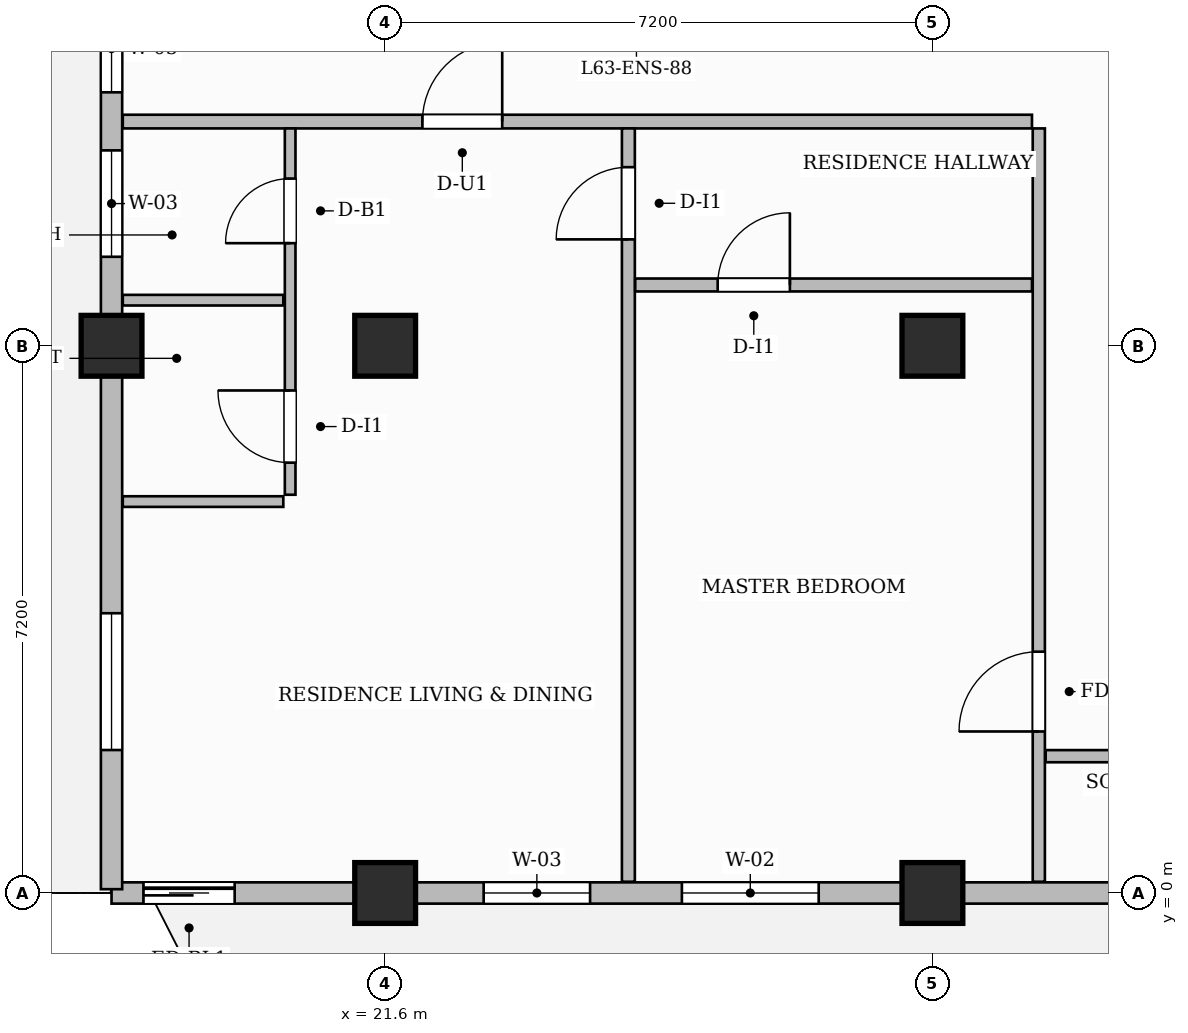
"""IFC4 building model, lengths in metres.
Left out: names, types, materials, properties, quantities, classifications, styles, units other than length and angle.
Written with IfcOpenShell. Run it as: python <this file> out.ifc"""

import sys

from ifc_helpers import new_model, si_unit, direction, frame, frame_2d, origin, origin_2d, place, context, subcontext, project, spatial, rectangle, extrude, source, transform, mapped, element, fill, save


model = new_model("IFC4")
c1 = context("Model", 3, precision=1e-05, world=origin(), true_north=direction((0.0, 1.0)))
c2 = subcontext(c1, "Body", "Model", "MODEL_VIEW")
j1 = project(units=[si_unit("LENGTHUNIT", "METRE"), si_unit("PLANEANGLEUNIT", "RADIAN")], contexts=[c1])
p1 = place(None, origin())
s1 = spatial("IfcSite", under=j1, at=p1, CompositionType="ELEMENT")
p2 = place(p1, origin())
s2 = spatial("IfcBuilding", under=s1, at=p2, CompositionType="ELEMENT")
p3 = place(p2, frame((0.0, 0.0, 251.95)))
s3 = spatial("IfcBuildingStorey", under=s2, at=p3, CompositionType="ELEMENT", Elevation=251.95)
m1 = source(origin(), c2, "Body", "SweptSolid", [
    extrude(rectangle(XDim=0.8, YDim=0.8, at=origin_2d()), origin(), (0.0, 0.0, 1.0), 3.85),
])
for number, where, z_axis, x_axis in (
    (1, (21.6, 0.0, 0.0), (0.0, 0.0, 1.0), (1.0, 0.0, 0.0)),
    (2, (21.6, 7.2, 0.0), (0.0, 0.0, 1.0), (1.0, 0.0, 0.0)),
    (3, (28.8, 0.0, 0.0), (0.0, 0.0, 1.0), (1.0, 0.0, 0.0)),
    (4, (28.8, 7.2, 0.0), (0.0, 0.0, 1.0), (1.0, 0.0, 0.0)),
    (5, (18.0, 7.2, 0.0), (0.0, 0.0, 1.0), (1.0, 0.0, 0.0)),
):
    element("IfcColumn", number, at=place(p3, frame(where, z_axis=z_axis, x_axis=x_axis)), inside=s3, PredefinedType="COLUMN", context=c2, shape_type="MappedRepresentation", body=[
        mapped(m1, transform((0.0, 0.0, 0.0), scale=1.0)),
    ])
p4 = place(p3, frame((18.148, 10.15, 0.0), z_axis=(0.0, 0.0, 1.0), x_axis=(1.0, 0.0, 0.0)))
e6 = element("IfcWall", 6, at=p4, inside=s3, PredefinedType="PARTITIONING", context=c2, shape_type="SweptSolid", body=[
    extrude(rectangle(XDim=11.962, YDim=0.18, at=frame_2d((5.981, 0.0))), origin(), (0.0, 0.0, 1.0), 3.6),
])
p5 = place(p4, frame((3.942, 0.0, 0.0)))
e7 = element("IfcOpeningElement", 7, at=p5, cuts=e6, PredefinedType="OPENING", context=c2, shape_type="SweptSolid", body=[
    extrude(rectangle(XDim=1.05, YDim=2.25, at=frame_2d((0.525, 1.125))), frame((0.0, 0.1, 0.0), z_axis=(0.0, -1.0, 0.0), x_axis=(1.0, 0.0, 0.0)), (0.0, 0.0, 1.0), 0.2),
])
p6 = place(p3, frame((30.2, 0.148, 0.0), z_axis=(0.0, 0.0, 1.0), x_axis=(0.0, 1.0, 0.0)))
e8 = element("IfcWall", 8, at=p6, inside=s3, PredefinedType="PARTITIONING", context=c2, shape_type="SweptSolid", body=[
    extrude(rectangle(XDim=9.912, YDim=0.16, at=frame_2d((4.956, 0.0))), origin(), (0.0, 0.0, 1.0), 3.6),
])
p7 = place(p6, frame((1.977, 0.0, 0.0)))
e9 = element("IfcOpeningElement", 9, at=p7, cuts=e8, PredefinedType="OPENING", context=c2, shape_type="SweptSolid", body=[
    extrude(rectangle(XDim=1.05, YDim=2.15, at=frame_2d((0.525, 1.075))), frame((0.0, 0.09, 0.0), z_axis=(0.0, -1.0, 0.0), x_axis=(1.0, 0.0, 0.0)), (0.0, 0.0, 1.0), 0.18),
])
p8 = place(p3, frame((30.29, 1.8, 0.0), z_axis=(0.0, 0.0, 1.0), x_axis=(1.0, 0.0, 0.0)))
e10 = element("IfcWall", 10, at=p8, inside=s3, PredefinedType="PARTITIONING", context=c2, shape_type="SweptSolid", body=[
    extrude(rectangle(XDim=19.37, YDim=0.16, at=frame_2d((9.685, 0.0))), origin(), (0.0, 0.0, 1.0), 3.6),
])
p9 = place(p8, frame((5.074, 0.0, 0.0)))
e11 = element("IfcOpeningElement", 11, at=p9, cuts=e10, PredefinedType="OPENING", context=c2, shape_type="SweptSolid", body=[
    extrude(rectangle(XDim=0.9, YDim=2.15, at=frame_2d((0.45, 1.075))), frame((0.0, 0.09, 0.0), z_axis=(0.0, -1.0, 0.0), x_axis=(1.0, 0.0, 0.0)), (0.0, 0.0, 1.0), 0.18),
])
p10 = place(p8, frame((14.06, 0.0, 0.0)))
e12 = element("IfcOpeningElement", 12, at=p10, cuts=e10, PredefinedType="OPENING", context=c2, shape_type="SweptSolid", body=[
    extrude(rectangle(XDim=0.9, YDim=2.15, at=frame_2d((0.45, 1.075))), frame((0.0, 0.09, 0.0), z_axis=(0.0, -1.0, 0.0), x_axis=(1.0, 0.0, 0.0)), (0.0, 0.0, 1.0), 0.18),
])
p11 = place(p3, frame((20.35, 5.24, 0.0), z_axis=(0.0, 0.0, 1.0), x_axis=(0.0, 1.0, 0.0)))
e13 = element("IfcWall", 13, at=p11, inside=s3, PredefinedType="PARTITIONING", context=c2, shape_type="SweptSolid", body=[
    extrude(rectangle(XDim=4.82, YDim=0.14, at=frame_2d((2.41, 0.0))), origin(), (0.0, 0.0, 1.0), 3.6),
])
p12 = place(p11, frame((0.422, 0.0, 0.0)))
e14 = element("IfcOpeningElement", 14, at=p12, cuts=e13, PredefinedType="OPENING", context=c2, shape_type="SweptSolid", body=[
    extrude(rectangle(XDim=0.95, YDim=2.15, at=frame_2d((0.475, 1.075))), frame((0.0, 0.08, 0.0), z_axis=(0.0, -1.0, 0.0), x_axis=(1.0, 0.0, 0.0)), (0.0, 0.0, 1.0), 0.16),
])
p13 = place(p11, frame((3.31, 0.0, 0.0)))
e15 = element("IfcOpeningElement", 15, at=p13, cuts=e13, PredefinedType="OPENING", context=c2, shape_type="SweptSolid", body=[
    extrude(rectangle(XDim=0.85, YDim=2.1, at=frame_2d((0.425, 1.05))), frame((0.0, 0.08, 0.0), z_axis=(0.0, -1.0, 0.0), x_axis=(1.0, 0.0, 0.0)), (0.0, 0.0, 1.0), 0.16),
])
for number, where, z_axis, x_axis in (
    (16, (18.148, 7.8, 0.0), (0.0, 0.0, 1.0), (1.0, 0.0, 0.0)),
    (17, (18.148, 5.15, 0.0), (0.0, 0.0, 1.0), (1.0, 0.0, 0.0)),
):
    element("IfcWall", number, at=place(p3, frame(where, z_axis=z_axis, x_axis=x_axis)), inside=s3, PredefinedType="PARTITIONING", context=c2, shape_type="SweptSolid", body=[
        extrude(rectangle(XDim=2.112, YDim=0.14, at=frame_2d((1.056, 0.0))), origin(), (0.0, 0.0, 1.0), 3.6),
    ])
p14 = place(p3, frame((24.8, 0.148, 0.0), z_axis=(0.0, 0.0, 1.0), x_axis=(0.0, 1.0, 0.0)))
e18 = element("IfcWall", 18, at=p14, inside=s3, PredefinedType="PARTITIONING", context=c2, shape_type="SweptSolid", body=[
    extrude(rectangle(XDim=9.912, YDim=0.17, at=frame_2d((4.956, 0.0))), origin(), (0.0, 0.0, 1.0), 3.6),
])
p15 = place(p14, frame((8.452, 0.0, 0.0)))
e19 = element("IfcOpeningElement", 19, at=p15, cuts=e18, PredefinedType="OPENING", context=c2, shape_type="SweptSolid", body=[
    extrude(rectangle(XDim=0.95, YDim=2.15, at=frame_2d((0.475, 1.075))), frame((0.0, 0.095, 0.0), z_axis=(0.0, -1.0, 0.0), x_axis=(1.0, 0.0, 0.0)), (0.0, 0.0, 1.0), 0.19),
])
p16 = place(p3, frame((24.89, 8.0, 0.0), z_axis=(0.0, 0.0, 1.0), x_axis=(1.0, 0.0, 0.0)))
e20 = element("IfcWall", 20, at=p16, inside=s3, PredefinedType="PARTITIONING", context=c2, shape_type="SweptSolid", body=[
    extrude(rectangle(XDim=5.22, YDim=0.17, at=frame_2d((2.61, 0.0))), origin(), (0.0, 0.0, 1.0), 3.6),
])
p17 = place(p16, frame((1.085, 0.0, 0.0)))
e21 = element("IfcOpeningElement", 21, at=p17, cuts=e20, PredefinedType="OPENING", context=c2, shape_type="SweptSolid", body=[
    extrude(rectangle(XDim=0.95, YDim=2.15, at=frame_2d((0.475, 1.075))), frame((0.0, 0.095, 0.0), z_axis=(0.0, -1.0, 0.0), x_axis=(1.0, 0.0, 0.0)), (0.0, 0.0, 1.0), 0.19),
])
p18 = place(p3, frame((18.0, 0.0, 0.0), z_axis=(0.0, 0.0, 1.0), x_axis=(1.0, 0.0, 0.0)))
e22 = element("IfcWall", 22, at=p18, inside=s3, PredefinedType="SOLIDWALL", context=c2, shape_type="SweptSolid", body=[
    extrude(rectangle(XDim=31.8, YDim=0.28, at=frame_2d((15.9, 0.0))), origin(), (0.0, 0.0, 1.0), 3.135),
])
p19 = place(p18, frame((0.42, 0.0, 0.0)))
e23 = element("IfcOpeningElement", 23, at=p19, cuts=e22, PredefinedType="OPENING", context=c2, shape_type="SweptSolid", body=[
    extrude(rectangle(XDim=1.2, YDim=2.2, at=frame_2d((0.6, 1.1))), frame((0.0, 0.15, 0.0), z_axis=(0.0, -1.0, 0.0), x_axis=(1.0, 0.0, 0.0)), (0.0, 0.0, 1.0), 0.3),
])
p20 = place(p18, frame((4.896, 0.0, 0.8)))
e24 = element("IfcOpeningElement", 24, at=p20, cuts=e22, PredefinedType="OPENING", context=c2, shape_type="SweptSolid", body=[
    extrude(rectangle(XDim=1.4, YDim=1.85, at=frame_2d((0.7, 0.925))), frame((0.0, 0.15, 0.0), z_axis=(0.0, -1.0, 0.0), x_axis=(1.0, 0.0, 0.0)), (0.0, 0.0, 1.0), 0.3),
])
p21 = place(p18, frame((7.504, 0.0, 0.8)))
e25 = element("IfcOpeningElement", 25, at=p21, cuts=e22, PredefinedType="OPENING", context=c2, shape_type="SweptSolid", body=[
    extrude(rectangle(XDim=1.8, YDim=1.85, at=frame_2d((0.9, 0.925))), frame((0.0, 0.15, 0.0), z_axis=(0.0, -1.0, 0.0), x_axis=(1.0, 0.0, 0.0)), (0.0, 0.0, 1.0), 0.3),
])
p22 = place(p18, frame((13.204, 0.0, 0.8)))
e26 = element("IfcOpeningElement", 26, at=p22, cuts=e22, PredefinedType="OPENING", context=c2, shape_type="SweptSolid", body=[
    extrude(rectangle(XDim=1.8, YDim=1.85, at=frame_2d((0.9, 0.925))), frame((0.0, 0.15, 0.0), z_axis=(0.0, -1.0, 0.0), x_axis=(1.0, 0.0, 0.0)), (0.0, 0.0, 1.0), 0.3),
])
p23 = place(p18, frame((18.796, 0.0, 0.8)))
e27 = element("IfcOpeningElement", 27, at=p23, cuts=e22, PredefinedType="OPENING", context=c2, shape_type="SweptSolid", body=[
    extrude(rectangle(XDim=1.8, YDim=1.85, at=frame_2d((0.9, 0.925))), frame((0.0, 0.15, 0.0), z_axis=(0.0, -1.0, 0.0), x_axis=(1.0, 0.0, 0.0)), (0.0, 0.0, 1.0), 0.3),
])
p24 = place(p18, frame((22.029, 0.0, 0.8)))
e28 = element("IfcOpeningElement", 28, at=p24, cuts=e22, PredefinedType="OPENING", context=c2, shape_type="SweptSolid", body=[
    extrude(rectangle(XDim=0.95, YDim=1.75, at=frame_2d((0.475, 0.875))), frame((0.0, 0.15, 0.0), z_axis=(0.0, -1.0, 0.0), x_axis=(1.0, 0.0, 0.0)), (0.0, 0.0, 1.0), 0.3),
])
p25 = place(p18, frame((25.475, 0.0, 0.8)))
e29 = element("IfcOpeningElement", 29, at=p25, cuts=e22, PredefinedType="OPENING", context=c2, shape_type="SweptSolid", body=[
    extrude(rectangle(XDim=1.8, YDim=1.85, at=frame_2d((0.9, 0.925))), frame((0.0, 0.15, 0.0), z_axis=(0.0, -1.0, 0.0), x_axis=(1.0, 0.0, 0.0)), (0.0, 0.0, 1.0), 0.3),
])
p26 = place(p18, frame((28.525, 0.0, 0.8)))
e30 = element("IfcOpeningElement", 30, at=p26, cuts=e22, PredefinedType="OPENING", context=c2, shape_type="SweptSolid", body=[
    extrude(rectangle(XDim=1.8, YDim=1.85, at=frame_2d((0.9, 0.925))), frame((0.0, 0.15, 0.0), z_axis=(0.0, -1.0, 0.0), x_axis=(1.0, 0.0, 0.0)), (0.0, 0.0, 1.0), 0.3),
])
p27 = place(p3, frame((18.0, 0.05, 0.0), z_axis=(0.0, 0.0, 1.0), x_axis=(0.0, 1.0, 0.0)))
e31 = element("IfcWall", 31, at=p27, inside=s3, PredefinedType="SOLIDWALL", context=c2, shape_type="SweptSolid", body=[
    extrude(rectangle(XDim=21.5, YDim=0.28, at=frame_2d((10.75, 0.0))), origin(), (0.0, 0.0, 1.0), 3.6),
])
p28 = place(p27, frame((1.831, 0.0, 0.8)))
e32 = element("IfcOpeningElement", 32, at=p28, cuts=e31, PredefinedType="OPENING", context=c2, shape_type="SweptSolid", body=[
    extrude(rectangle(XDim=1.8, YDim=1.85, at=frame_2d((0.9, 0.925))), frame((0.0, 0.15, 0.0), z_axis=(0.0, -1.0, 0.0), x_axis=(1.0, 0.0, 0.0)), (0.0, 0.0, 1.0), 0.3),
])
p29 = place(p27, frame((8.321, 0.0, 0.8)))
e33 = element("IfcOpeningElement", 33, at=p29, cuts=e31, PredefinedType="OPENING", context=c2, shape_type="SweptSolid", body=[
    extrude(rectangle(XDim=1.4, YDim=1.85, at=frame_2d((0.7, 0.925))), frame((0.0, 0.15, 0.0), z_axis=(0.0, -1.0, 0.0), x_axis=(1.0, 0.0, 0.0)), (0.0, 0.0, 1.0), 0.3),
])
p30 = place(p27, frame((10.485, 0.0, 0.8)))
e34 = element("IfcOpeningElement", 34, at=p30, cuts=e31, PredefinedType="OPENING", context=c2, shape_type="SweptSolid", body=[
    extrude(rectangle(XDim=1.15, YDim=1.8, at=frame_2d((0.575, 0.9))), frame((0.0, 0.15, 0.0), z_axis=(0.0, -1.0, 0.0), x_axis=(1.0, 0.0, 0.0)), (0.0, 0.0, 1.0), 0.3),
])
p31 = place(p27, frame((12.295, 0.0, 0.8)))
e35 = element("IfcOpeningElement", 35, at=p31, cuts=e31, PredefinedType="OPENING", context=c2, shape_type="SweptSolid", body=[
    extrude(rectangle(XDim=0.95, YDim=1.75, at=frame_2d((0.475, 0.875))), frame((0.0, 0.15, 0.0), z_axis=(0.0, -1.0, 0.0), x_axis=(1.0, 0.0, 0.0)), (0.0, 0.0, 1.0), 0.3),
])
p32 = place(p27, frame((15.77, 0.0, 0.8)))
e36 = element("IfcOpeningElement", 36, at=p32, cuts=e31, PredefinedType="OPENING", context=c2, shape_type="SweptSolid", body=[
    extrude(rectangle(XDim=1.8, YDim=1.85, at=frame_2d((0.9, 0.925))), frame((0.0, 0.15, 0.0), z_axis=(0.0, -1.0, 0.0), x_axis=(1.0, 0.0, 0.0)), (0.0, 0.0, 1.0), 0.3),
])
p33 = place(p27, frame((18.71, 0.0, 0.8)))
e37 = element("IfcOpeningElement", 37, at=p33, cuts=e31, PredefinedType="OPENING", context=c2, shape_type="SweptSolid", body=[
    extrude(rectangle(XDim=1.8, YDim=1.85, at=frame_2d((0.9, 0.925))), frame((0.0, 0.15, 0.0), z_axis=(0.0, -1.0, 0.0), x_axis=(1.0, 0.0, 0.0)), (0.0, 0.0, 1.0), 0.3),
])
m2 = source(origin(), c2, "Body", "SweptSolid", [
    extrude(rectangle(XDim=1.05, YDim=2.15, at=frame_2d((0.525, 1.075))), frame((0.0, 0.025, 0.0), z_axis=(0.0, -1.0, 0.0), x_axis=(1.0, 0.0, 0.0)), (0.0, 0.0, 1.0), 0.05),
])
p34 = place(p7, origin())
e38 = element("IfcDoor", 38, at=p34, inside=s3, OperationType="SINGLE_SWING_LEFT", PredefinedType="DOOR", context=c2, shape_type="MappedRepresentation", body=[
    mapped(m2, transform((0.0, 0.0, 0.0), scale=1.0)),
])
fill(e9, e38)
m3 = source(origin(), c2, "Body", "SweptSolid", [
    extrude(rectangle(XDim=0.95, YDim=2.15, at=frame_2d((0.475, 1.075))), frame((0.0, 0.025, 0.0), z_axis=(0.0, -1.0, 0.0), x_axis=(1.0, 0.0, 0.0)), (0.0, 0.0, 1.0), 0.05),
])
p35 = place(p12, origin())
e39 = element("IfcDoor", 39, at=p35, inside=s3, OperationType="SINGLE_SWING_RIGHT", PredefinedType="DOOR", context=c2, shape_type="MappedRepresentation", body=[
    mapped(m3, transform((0.0, 0.0, 0.0), scale=1.0)),
])
fill(e14, e39)
m4 = source(origin(), c2, "Body", "SweptSolid", [
    extrude(rectangle(XDim=0.85, YDim=2.1, at=frame_2d((0.425, 1.05))), frame((0.0, 0.025, 0.0), z_axis=(0.0, -1.0, 0.0), x_axis=(1.0, 0.0, 0.0)), (0.0, 0.0, 1.0), 0.05),
])
p36 = place(p13, origin())
e40 = element("IfcDoor", 40, at=p36, inside=s3, OperationType="SINGLE_SWING_LEFT", PredefinedType="DOOR", context=c2, shape_type="MappedRepresentation", body=[
    mapped(m4, transform((0.0, 0.0, 0.0), scale=1.0)),
])
fill(e15, e40)
m5 = source(origin(), c2, "Body", "SweptSolid", [
    extrude(rectangle(XDim=1.05, YDim=2.25, at=frame_2d((0.525, 1.125))), frame((0.0, 0.025, 0.0), z_axis=(0.0, -1.0, 0.0), x_axis=(1.0, 0.0, 0.0)), (0.0, 0.0, 1.0), 0.05),
])
p37 = place(p5, origin())
e41 = element("IfcDoor", 41, at=p37, inside=s3, OperationType="SINGLE_SWING_RIGHT", PredefinedType="DOOR", context=c2, shape_type="MappedRepresentation", body=[
    mapped(m5, transform((0.0, 0.0, 0.0), scale=1.0)),
])
fill(e7, e41)
p38 = place(p15, origin())
e42 = element("IfcDoor", 42, at=p38, inside=s3, OperationType="SINGLE_SWING_LEFT", PredefinedType="DOOR", context=c2, shape_type="MappedRepresentation", body=[
    mapped(m3, transform((0.0, 0.0, 0.0), scale=1.0)),
])
fill(e19, e42)
p39 = place(p17, origin())
e43 = element("IfcDoor", 43, at=p39, inside=s3, OperationType="SINGLE_SWING_RIGHT", PredefinedType="DOOR", context=c2, shape_type="MappedRepresentation", body=[
    mapped(m3, transform((0.0, 0.0, 0.0), scale=1.0)),
])
fill(e21, e43)
m6 = source(origin(), c2, "Body", "SweptSolid", [
    extrude(rectangle(XDim=1.2, YDim=2.2, at=frame_2d((0.6, 1.1))), frame((0.0, 0.025, 0.0), z_axis=(0.0, -1.0, 0.0), x_axis=(1.0, 0.0, 0.0)), (0.0, 0.0, 1.0), 0.05),
])
p40 = place(p19, origin())
e44 = element("IfcDoor", 44, at=p40, inside=s3, OperationType="SLIDING_TO_LEFT", PredefinedType="DOOR", context=c2, shape_type="MappedRepresentation", body=[
    mapped(m6, transform((0.0, 0.0, 0.0), scale=1.0)),
])
fill(e23, e44)
m7 = source(origin(), c2, "Body", "SweptSolid", [
    extrude(rectangle(XDim=1.4, YDim=1.85, at=frame_2d((0.7, 0.925))), frame((0.0, 0.03, 0.0), z_axis=(0.0, -1.0, 0.0), x_axis=(1.0, 0.0, 0.0)), (0.0, 0.0, 1.0), 0.06),
])
p41 = place(p20, origin())
e45 = element("IfcWindow", 45, at=p41, inside=s3, PartitioningType="SINGLE_PANEL", PredefinedType="WINDOW", context=c2, shape_type="MappedRepresentation", body=[
    mapped(m7, transform((0.0, 0.0, 0.0), scale=1.0)),
])
fill(e24, e45)
m8 = source(origin(), c2, "Body", "SweptSolid", [
    extrude(rectangle(XDim=1.8, YDim=1.85, at=frame_2d((0.9, 0.925))), frame((0.0, 0.03, 0.0), z_axis=(0.0, -1.0, 0.0), x_axis=(1.0, 0.0, 0.0)), (0.0, 0.0, 1.0), 0.06),
])
p42 = place(p21, origin())
e46 = element("IfcWindow", 46, at=p42, inside=s3, PartitioningType="DOUBLE_PANEL_VERTICAL", PredefinedType="WINDOW", context=c2, shape_type="MappedRepresentation", body=[
    mapped(m8, transform((0.0, 0.0, 0.0), scale=1.0)),
])
fill(e25, e46)
p43 = place(p28, origin())
e47 = element("IfcWindow", 47, at=p43, inside=s3, PartitioningType="DOUBLE_PANEL_VERTICAL", PredefinedType="WINDOW", context=c2, shape_type="MappedRepresentation", body=[
    mapped(m8, transform((0.0, 0.0, 0.0), scale=1.0)),
])
fill(e32, e47)
p44 = place(p29, origin())
e48 = element("IfcWindow", 48, at=p44, inside=s3, PartitioningType="SINGLE_PANEL", PredefinedType="WINDOW", context=c2, shape_type="MappedRepresentation", body=[
    mapped(m7, transform((0.0, 0.0, 0.0), scale=1.0)),
])
fill(e33, e48)
m9 = source(origin(), c2, "Body", "SweptSolid", [
    extrude(rectangle(XDim=1.15, YDim=1.8, at=frame_2d((0.575, 0.9))), frame((0.0, 0.03, 0.0), z_axis=(0.0, -1.0, 0.0), x_axis=(1.0, 0.0, 0.0)), (0.0, 0.0, 1.0), 0.06),
])
p45 = place(p30, origin())
e49 = element("IfcWindow", 49, at=p45, inside=s3, PartitioningType="SINGLE_PANEL", PredefinedType="WINDOW", context=c2, shape_type="MappedRepresentation", body=[
    mapped(m9, transform((0.0, 0.0, 0.0), scale=1.0)),
])
fill(e34, e49)
save(model, sys.argv[1])
